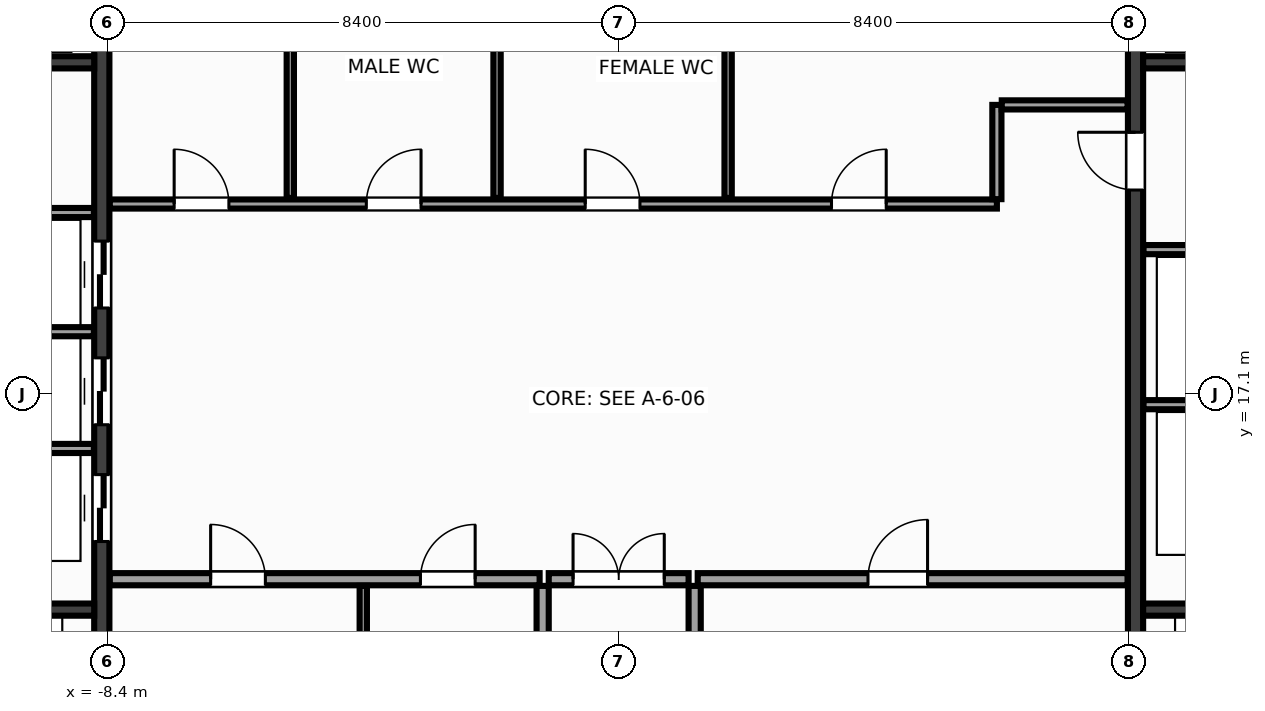
"""IFC4 building model, lengths in metres.
Left out: names, types, materials, properties, quantities, classifications, styles, units other than length and angle.
Written with IfcOpenShell. Run it as: python <this file> out.ifc"""

import sys

from ifc_helpers import new_model, si_unit, direction, frame, frame_2d, origin, place, context, subcontext, project, spatial, rectangle, extrude, source, transform, mapped, element, fill, save


model = new_model("IFC4")
c1 = context("Model", 3, precision=1e-05, world=origin(), true_north=direction((0.0, 1.0)))
c2 = subcontext(c1, "Body", "Model", "MODEL_VIEW")
j1 = project(units=[si_unit("LENGTHUNIT", "METRE"), si_unit("PLANEANGLEUNIT", "RADIAN")], contexts=[c1])
p1 = place(None, origin())
s1 = spatial("IfcSite", under=j1, at=p1, CompositionType="ELEMENT")
p2 = place(p1, origin())
s2 = spatial("IfcBuilding", under=s1, at=p2, CompositionType="ELEMENT")
p3 = place(p2, frame((0.0, 0.0, 214.4)))
s3 = spatial("IfcBuildingStorey", under=s2, at=p3, CompositionType="ELEMENT", Elevation=214.4)
m1 = source(origin(), c2, "Body", "SweptSolid", [
    extrude(rectangle(XDim=13.1, YDim=0.25, at=frame_2d((6.55, 0.0))), origin(), (0.0, 0.0, 1.0), 3.6),
])
p4 = place(p3, frame((-8.5, 10.45, 0.0), z_axis=(0.0, 0.0, 1.0), x_axis=(0.0, 1.0, 0.0)))
e1 = element("IfcWall", 1, at=p4, inside=s3, PredefinedType="SHEAR", context=c2, shape_type="MappedRepresentation", body=[
    mapped(m1, transform((0.0, 0.0, 0.0), x_axis=(1.0, 0.0, 0.0), y_axis=(0.0, 1.0, 0.0), z_axis=(0.0, 0.0, 1.0), scale=1.0)),
])
p5 = place(p4, frame((4.22, 0.0, 0.0)))
e2 = element("IfcOpeningElement", 2, at=p5, cuts=e1, PredefinedType="OPENING", context=c2, shape_type="SweptSolid", body=[
    extrude(rectangle(XDim=1.1, YDim=2.15, at=frame_2d((0.55, 1.075))), frame((0.0, 0.137, 0.0), z_axis=(0.0, -1.0, 0.0), x_axis=(1.0, 0.0, 0.0)), (0.0, 0.0, 1.0), 0.274),
])
p6 = place(p4, frame((6.14, 0.0, 0.0)))
e3 = element("IfcOpeningElement", 3, at=p6, cuts=e1, PredefinedType="OPENING", context=c2, shape_type="SweptSolid", body=[
    extrude(rectangle(XDim=1.1, YDim=2.15, at=frame_2d((0.55, 1.075))), frame((0.0, 0.137, 0.0), z_axis=(0.0, -1.0, 0.0), x_axis=(1.0, 0.0, 0.0)), (0.0, 0.0, 1.0), 0.274),
])
p7 = place(p4, frame((8.06, 0.0, 0.0)))
e4 = element("IfcOpeningElement", 4, at=p7, cuts=e1, PredefinedType="OPENING", context=c2, shape_type="SweptSolid", body=[
    extrude(rectangle(XDim=1.1, YDim=2.15, at=frame_2d((0.55, 1.075))), frame((0.0, 0.137, 0.0), z_axis=(0.0, -1.0, 0.0), x_axis=(1.0, 0.0, 0.0)), (0.0, 0.0, 1.0), 0.274),
])
p8 = place(p3, frame((8.5, 10.45, 0.0), z_axis=(0.0, 0.0, 1.0), x_axis=(0.0, 1.0, 0.0)))
e5 = element("IfcWall", 5, at=p8, inside=s3, PredefinedType="SHEAR", context=c2, shape_type="MappedRepresentation", body=[
    mapped(m1, transform((0.0, 0.0, 0.0), x_axis=(1.0, 0.0, 0.0), y_axis=(0.0, 1.0, 0.0), z_axis=(0.0, 0.0, 1.0), scale=1.0)),
])
p9 = place(p8, frame((10.0, 0.0, 0.0)))
e6 = element("IfcOpeningElement", 6, at=p9, cuts=e5, PredefinedType="OPENING", context=c2, shape_type="SweptSolid", body=[
    extrude(rectangle(XDim=0.95, YDim=2.15, at=frame_2d((0.475, 1.075))), frame((0.0, 0.137, 0.0), z_axis=(0.0, -1.0, 0.0), x_axis=(1.0, 0.0, 0.0)), (0.0, 0.0, 1.0), 0.274),
])
m2 = source(origin(), c2, "Body", "SweptSolid", [
    extrude(rectangle(XDim=2.825, YDim=0.2, at=frame_2d((1.413, 0.0))), origin(), (0.0, 0.0, 1.0), 3.6),
])
for number, where, z_axis, x_axis in (
    (7, (-11.45, 13.55, 0.0), (0.0, 0.0, 1.0), (1.0, 0.0, 0.0)),
    (8, (8.625, 13.55, 0.0), (0.0, 0.0, 1.0), (1.0, 0.0, 0.0)),
):
    element("IfcWall", number, at=place(p3, frame(where, z_axis=z_axis, x_axis=x_axis)), inside=s3, PredefinedType="SHEAR", context=c2, shape_type="MappedRepresentation", body=[
        mapped(m2, transform((0.0, 0.0, 0.0), x_axis=(1.0, 0.0, 0.0), y_axis=(0.0, 1.0, 0.0), z_axis=(0.0, 0.0, 1.0), scale=1.0)),
    ])
m3 = source(origin(), c2, "Body", "SweptSolid", [
    extrude(rectangle(XDim=3.02, YDim=0.2, at=frame_2d((1.51, 0.0))), origin(), (0.0, 0.0, 1.0), 3.6),
])
for number, where, z_axis, x_axis in (
    (9, (-11.645, 22.55, 0.0), (0.0, 0.0, 1.0), (1.0, 0.0, 0.0)),
    (10, (8.625, 22.55, 0.0), (0.0, 0.0, 1.0), (1.0, 0.0, 0.0)),
):
    element("IfcWall", number, at=place(p3, frame(where, z_axis=z_axis, x_axis=x_axis)), inside=s3, PredefinedType="SHEAR", context=c2, shape_type="MappedRepresentation", body=[
        mapped(m3, transform((0.0, 0.0, 0.0), x_axis=(1.0, 0.0, 0.0), y_axis=(0.0, 1.0, 0.0), z_axis=(0.0, 0.0, 1.0), scale=1.0)),
    ])
m4 = source(origin(), c2, "Body", "SweptSolid", [
    extrude(rectangle(XDim=3.01, YDim=0.15, at=frame_2d((1.505, 0.0))), origin(), (0.0, 0.0, 1.0), 3.38),
])
for number, where, z_axis, x_axis in (
    (11, (-11.64, 16.2, 0.0), (0.0, 0.0, 1.0), (1.0, 0.0, 0.0)),
    (12, (-11.64, 18.12, 0.0), (0.0, 0.0, 1.0), (1.0, 0.0, 0.0)),
    (13, (-11.64, 20.08, 0.0), (0.0, 0.0, 1.0), (1.0, 0.0, 0.0)),
    (14, (8.63, 16.92, 0.0), (0.0, 0.0, 1.0), (1.0, 0.0, 0.0)),
    (15, (8.63, 19.47, 0.0), (0.0, 0.0, 1.0), (1.0, 0.0, 0.0)),
):
    element("IfcWall", number, at=place(p3, frame(where, z_axis=z_axis, x_axis=x_axis)), inside=s3, PredefinedType="PARTITIONING", context=c2, shape_type="MappedRepresentation", body=[
        mapped(m4, transform((0.0, 0.0, 0.0), x_axis=(1.0, 0.0, 0.0), y_axis=(0.0, 1.0, 0.0), z_axis=(0.0, 0.0, 1.0), scale=1.0)),
    ])
m5 = source(origin(), c2, "Body", "SweptSolid", [
    extrude(rectangle(XDim=7.07, YDim=0.2, at=frame_2d((3.535, 0.0))), origin(), (0.0, 0.0, 1.0), 3.38),
])
p10 = place(p3, frame((-8.37, 14.05, 0.0), z_axis=(0.0, 0.0, 1.0), x_axis=(1.0, 0.0, 0.0)))
e16 = element("IfcWall", 16, at=p10, inside=s3, PredefinedType="PARTITIONING", context=c2, shape_type="MappedRepresentation", body=[
    mapped(m5, transform((0.0, 0.0, 0.0), x_axis=(1.0, 0.0, 0.0), y_axis=(0.0, 1.0, 0.0), z_axis=(0.0, 0.0, 1.0), scale=1.0)),
])
p11 = place(p10, frame((1.66, 0.0, 0.0)))
e17 = element("IfcOpeningElement", 17, at=p11, cuts=e16, PredefinedType="OPENING", context=c2, shape_type="SweptSolid", body=[
    extrude(rectangle(XDim=0.9, YDim=2.15, at=frame_2d((0.45, 1.075))), frame((0.0, 0.112, 0.0), z_axis=(0.0, -1.0, 0.0), x_axis=(1.0, 0.0, 0.0)), (0.0, 0.0, 1.0), 0.224),
])
p12 = place(p10, frame((5.11, 0.0, 0.0)))
e18 = element("IfcOpeningElement", 18, at=p12, cuts=e16, PredefinedType="OPENING", context=c2, shape_type="SweptSolid", body=[
    extrude(rectangle(XDim=0.9, YDim=2.15, at=frame_2d((0.45, 1.075))), frame((0.0, 0.112, 0.0), z_axis=(0.0, -1.0, 0.0), x_axis=(1.0, 0.0, 0.0)), (0.0, 0.0, 1.0), 0.224),
])
p13 = place(p3, frame((1.3, 14.05, 0.0), z_axis=(0.0, 0.0, 1.0), x_axis=(1.0, 0.0, 0.0)))
e19 = element("IfcWall", 19, at=p13, inside=s3, PredefinedType="PARTITIONING", context=c2, shape_type="MappedRepresentation", body=[
    mapped(m5, transform((0.0, 0.0, 0.0), x_axis=(1.0, 0.0, 0.0), y_axis=(0.0, 1.0, 0.0), z_axis=(0.0, 0.0, 1.0), scale=1.0)),
])
p14 = place(p13, frame((2.8, 0.0, 0.0)))
e20 = element("IfcOpeningElement", 20, at=p14, cuts=e19, PredefinedType="OPENING", context=c2, shape_type="SweptSolid", body=[
    extrude(rectangle(XDim=0.98, YDim=2.15, at=frame_2d((0.49, 1.075))), frame((0.0, 0.112, 0.0), z_axis=(0.0, -1.0, 0.0), x_axis=(1.0, 0.0, 0.0)), (0.0, 0.0, 1.0), 0.224),
])
m6 = source(origin(), c2, "Body", "SweptSolid", [
    extrude(rectangle(XDim=3.49, YDim=0.2, at=frame_2d((1.745, 0.0))), origin(), (0.0, 0.0, 1.0), 3.38),
])
for number, where, z_axis, x_axis in (
    (21, (-1.25, 10.45, 0.0), (0.0, 0.0, 1.0), (0.0, 1.0, 0.0)),
    (22, (1.25, 10.45, 0.0), (0.0, 0.0, 1.0), (0.0, 1.0, 0.0)),
):
    element("IfcWall", number, at=place(p3, frame(where, z_axis=z_axis, x_axis=x_axis)), inside=s3, PredefinedType="PARTITIONING", context=c2, shape_type="MappedRepresentation", body=[
        mapped(m6, transform((0.0, 0.0, 0.0), x_axis=(1.0, 0.0, 0.0), y_axis=(0.0, 1.0, 0.0), z_axis=(0.0, 0.0, 1.0), scale=1.0)),
    ])
m7 = source(origin(), c2, "Body", "SweptSolid", [
    extrude(rectangle(XDim=2.3, YDim=0.2, at=frame_2d((1.15, 0.0))), origin(), (0.0, 0.0, 1.0), 3.38),
])
p15 = place(p3, frame((-1.15, 14.05, 0.0), z_axis=(0.0, 0.0, 1.0), x_axis=(1.0, 0.0, 0.0)))
e23 = element("IfcWall", 23, at=p15, inside=s3, PredefinedType="PARTITIONING", context=c2, shape_type="MappedRepresentation", body=[
    mapped(m7, transform((0.0, 0.0, 0.0), x_axis=(1.0, 0.0, 0.0), y_axis=(0.0, 1.0, 0.0), z_axis=(0.0, 0.0, 1.0), scale=1.0)),
])
p16 = place(p15, frame((0.4, 0.0, 0.0)))
e24 = element("IfcOpeningElement", 24, at=p16, cuts=e23, PredefinedType="OPENING", context=c2, shape_type="SweptSolid", body=[
    extrude(rectangle(XDim=1.5, YDim=2.2, at=frame_2d((0.75, 1.1))), frame((0.0, 0.112, 0.0), z_axis=(0.0, -1.0, 0.0), x_axis=(1.0, 0.0, 0.0)), (0.0, 0.0, 1.0), 0.224),
])
m8 = source(origin(), c2, "Body", "SweptSolid", [
    extrude(rectangle(XDim=14.59, YDim=0.15, at=frame_2d((7.295, 0.0))), origin(), (0.0, 0.0, 1.0), 3.38),
])
p17 = place(p3, frame((-8.37, 20.22, 0.0), z_axis=(0.0, 0.0, 1.0), x_axis=(1.0, 0.0, 0.0)))
e25 = element("IfcWall", 25, at=p17, inside=s3, PredefinedType="PARTITIONING", context=c2, shape_type="MappedRepresentation", body=[
    mapped(m8, transform((0.0, 0.0, 0.0), x_axis=(1.0, 0.0, 0.0), y_axis=(0.0, 1.0, 0.0), z_axis=(0.0, 0.0, 1.0), scale=1.0)),
])
p18 = place(p17, frame((1.06, 0.0, 0.0)))
e26 = element("IfcOpeningElement", 26, at=p18, cuts=e25, PredefinedType="OPENING", context=c2, shape_type="SweptSolid", body=[
    extrude(rectangle(XDim=0.9, YDim=2.15, at=frame_2d((0.45, 1.075))), frame((0.0, 0.087, 0.0), z_axis=(0.0, -1.0, 0.0), x_axis=(1.0, 0.0, 0.0)), (0.0, 0.0, 1.0), 0.174),
])
p19 = place(p17, frame((4.22, 0.0, 0.0)))
e27 = element("IfcOpeningElement", 27, at=p19, cuts=e25, PredefinedType="OPENING", context=c2, shape_type="SweptSolid", body=[
    extrude(rectangle(XDim=0.9, YDim=2.15, at=frame_2d((0.45, 1.075))), frame((0.0, 0.087, 0.0), z_axis=(0.0, -1.0, 0.0), x_axis=(1.0, 0.0, 0.0)), (0.0, 0.0, 1.0), 0.174),
])
p20 = place(p17, frame((7.82, 0.0, 0.0)))
e28 = element("IfcOpeningElement", 28, at=p20, cuts=e25, PredefinedType="OPENING", context=c2, shape_type="SweptSolid", body=[
    extrude(rectangle(XDim=0.9, YDim=2.15, at=frame_2d((0.45, 1.075))), frame((0.0, 0.087, 0.0), z_axis=(0.0, -1.0, 0.0), x_axis=(1.0, 0.0, 0.0)), (0.0, 0.0, 1.0), 0.174),
])
p21 = place(p17, frame((11.87, 0.0, 0.0)))
e29 = element("IfcOpeningElement", 29, at=p21, cuts=e25, PredefinedType="OPENING", context=c2, shape_type="SweptSolid", body=[
    extrude(rectangle(XDim=0.9, YDim=2.15, at=frame_2d((0.45, 1.075))), frame((0.0, 0.087, 0.0), z_axis=(0.0, -1.0, 0.0), x_axis=(1.0, 0.0, 0.0)), (0.0, 0.0, 1.0), 0.174),
])
m9 = source(origin(), c2, "Body", "SweptSolid", [
    extrude(rectangle(XDim=1.55, YDim=0.15, at=frame_2d((0.775, 0.0))), origin(), (0.0, 0.0, 1.0), 3.38),
])
p22 = place(p3, frame((6.22, 20.3, 0.0), z_axis=(0.0, 0.0, 1.0), x_axis=(0.0, 1.0, 0.0)))
e30 = element("IfcWall", 30, at=p22, inside=s3, PredefinedType="PARTITIONING", context=c2, shape_type="MappedRepresentation", body=[
    mapped(m9, transform((0.0, 0.0, 0.0), x_axis=(1.0, 0.0, 0.0), y_axis=(0.0, 1.0, 0.0), z_axis=(0.0, 0.0, 1.0), scale=1.0)),
])
m10 = source(origin(), c2, "Body", "SweptSolid", [
    extrude(rectangle(XDim=2.07, YDim=0.15, at=frame_2d((1.035, 0.0))), origin(), (0.0, 0.0, 1.0), 3.38),
])
p23 = place(p3, frame((6.3, 21.85, 0.0), z_axis=(0.0, 0.0, 1.0), x_axis=(1.0, 0.0, 0.0)))
e31 = element("IfcWall", 31, at=p23, inside=s3, PredefinedType="PARTITIONING", context=c2, shape_type="MappedRepresentation", body=[
    mapped(m10, transform((0.0, 0.0, 0.0), x_axis=(1.0, 0.0, 0.0), y_axis=(0.0, 1.0, 0.0), z_axis=(0.0, 0.0, 1.0), scale=1.0)),
])
m11 = source(origin(), c2, "Body", "SweptSolid", [
    extrude(rectangle(XDim=3.49, YDim=0.12, at=frame_2d((1.745, 0.0))), origin(), (0.0, 0.0, 1.0), 3.38),
])
p24 = place(p3, frame((-4.2, 10.45, 0.0), z_axis=(0.0, 0.0, 1.0), x_axis=(0.0, 1.0, 0.0)))
e32 = element("IfcWall", 32, at=p24, inside=s3, PredefinedType="PARTITIONING", context=c2, shape_type="MappedRepresentation", body=[
    mapped(m11, transform((0.0, 0.0, 0.0), x_axis=(1.0, 0.0, 0.0), y_axis=(0.0, 1.0, 0.0), z_axis=(0.0, 0.0, 1.0), scale=1.0)),
])
m12 = source(origin(), c2, "Body", "SweptSolid", [
    extrude(rectangle(XDim=3.19, YDim=0.12, at=frame_2d((1.595, 0.0))), origin(), (0.0, 0.0, 1.0), 3.38),
])
for number, where, z_axis, x_axis in (
    (33, (-5.4, 20.32, 0.0), (0.0, 0.0, 1.0), (0.0, 1.0, 0.0)),
    (34, (-2.0, 20.32, 0.0), (0.0, 0.0, 1.0), (0.0, 1.0, 0.0)),
    (35, (1.8, 20.32, 0.0), (0.0, 0.0, 1.0), (0.0, 1.0, 0.0)),
):
    element("IfcWall", number, at=place(p3, frame(where, z_axis=z_axis, x_axis=x_axis)), inside=s3, PredefinedType="PARTITIONING", context=c2, shape_type="MappedRepresentation", body=[
        mapped(m12, transform((0.0, 0.0, 0.0), x_axis=(1.0, 0.0, 0.0), y_axis=(0.0, 1.0, 0.0), z_axis=(0.0, 0.0, 1.0), scale=1.0)),
    ])
m13 = source(origin(), c2, "Body", "SweptSolid", [
    extrude(rectangle(XDim=1.1, YDim=2.15, at=frame_2d((0.55, 1.075))), frame((0.0, 0.025, 0.0), z_axis=(0.0, -1.0, 0.0), x_axis=(1.0, 0.0, 0.0)), (0.0, 0.0, 1.0), 0.05),
])
p25 = place(p5, origin())
e36 = element("IfcDoor", 36, at=p25, inside=s3, OperationType="DOUBLE_DOOR_SLIDING", PredefinedType="DOOR", context=c2, shape_type="MappedRepresentation", body=[
    mapped(m13, transform((0.0, 0.0, 0.0), x_axis=(1.0, 0.0, 0.0), y_axis=(0.0, 1.0, 0.0), z_axis=(0.0, 0.0, 1.0), scale=1.0)),
])
fill(e2, e36)
p26 = place(p6, origin())
e37 = element("IfcDoor", 37, at=p26, inside=s3, OperationType="DOUBLE_DOOR_SLIDING", PredefinedType="DOOR", context=c2, shape_type="MappedRepresentation", body=[
    mapped(m13, transform((0.0, 0.0, 0.0), x_axis=(1.0, 0.0, 0.0), y_axis=(0.0, 1.0, 0.0), z_axis=(0.0, 0.0, 1.0), scale=1.0)),
])
fill(e3, e37)
p27 = place(p7, origin())
e38 = element("IfcDoor", 38, at=p27, inside=s3, OperationType="DOUBLE_DOOR_SLIDING", PredefinedType="DOOR", context=c2, shape_type="MappedRepresentation", body=[
    mapped(m13, transform((0.0, 0.0, 0.0), x_axis=(1.0, 0.0, 0.0), y_axis=(0.0, 1.0, 0.0), z_axis=(0.0, 0.0, 1.0), scale=1.0)),
])
fill(e4, e38)
m14 = source(origin(), c2, "Body", "SweptSolid", [
    extrude(rectangle(XDim=0.95, YDim=2.15, at=frame_2d((0.475, 1.075))), frame((0.0, 0.025, 0.0), z_axis=(0.0, -1.0, 0.0), x_axis=(1.0, 0.0, 0.0)), (0.0, 0.0, 1.0), 0.05),
])
p28 = place(p9, origin())
e39 = element("IfcDoor", 39, at=p28, inside=s3, OperationType="SINGLE_SWING_RIGHT", PredefinedType="DOOR", context=c2, shape_type="MappedRepresentation", body=[
    mapped(m14, transform((0.0, 0.0, 0.0), x_axis=(1.0, 0.0, 0.0), y_axis=(0.0, 1.0, 0.0), z_axis=(0.0, 0.0, 1.0), scale=1.0)),
])
fill(e6, e39)
m15 = source(origin(), c2, "Body", "SweptSolid", [
    extrude(rectangle(XDim=0.9, YDim=2.15, at=frame_2d((0.45, 1.075))), frame((0.0, 0.025, 0.0), z_axis=(0.0, -1.0, 0.0), x_axis=(1.0, 0.0, 0.0)), (0.0, 0.0, 1.0), 0.05),
])
p29 = place(p11, origin())
e40 = element("IfcDoor", 40, at=p29, inside=s3, OperationType="SINGLE_SWING_LEFT", PredefinedType="DOOR", context=c2, shape_type="MappedRepresentation", body=[
    mapped(m15, transform((0.0, 0.0, 0.0), x_axis=(1.0, 0.0, 0.0), y_axis=(0.0, 1.0, 0.0), z_axis=(0.0, 0.0, 1.0), scale=1.0)),
])
fill(e17, e40)
p30 = place(p12, origin())
e41 = element("IfcDoor", 41, at=p30, inside=s3, OperationType="SINGLE_SWING_RIGHT", PredefinedType="DOOR", context=c2, shape_type="MappedRepresentation", body=[
    mapped(m15, transform((0.0, 0.0, 0.0), x_axis=(1.0, 0.0, 0.0), y_axis=(0.0, 1.0, 0.0), z_axis=(0.0, 0.0, 1.0), scale=1.0)),
])
fill(e18, e41)
m16 = source(origin(), c2, "Body", "SweptSolid", [
    extrude(rectangle(XDim=0.98, YDim=2.15, at=frame_2d((0.49, 1.075))), frame((0.0, 0.025, 0.0), z_axis=(0.0, -1.0, 0.0), x_axis=(1.0, 0.0, 0.0)), (0.0, 0.0, 1.0), 0.05),
])
p31 = place(p14, origin())
e42 = element("IfcDoor", 42, at=p31, inside=s3, OperationType="SINGLE_SWING_RIGHT", PredefinedType="DOOR", context=c2, shape_type="MappedRepresentation", body=[
    mapped(m16, transform((0.0, 0.0, 0.0), x_axis=(1.0, 0.0, 0.0), y_axis=(0.0, 1.0, 0.0), z_axis=(0.0, 0.0, 1.0), scale=1.0)),
])
fill(e20, e42)
m17 = source(origin(), c2, "Body", "SweptSolid", [
    extrude(rectangle(XDim=1.5, YDim=2.2, at=frame_2d((0.75, 1.1))), frame((0.0, 0.025, 0.0), z_axis=(0.0, -1.0, 0.0), x_axis=(1.0, 0.0, 0.0)), (0.0, 0.0, 1.0), 0.05),
])
p32 = place(p16, origin())
e43 = element("IfcDoor", 43, at=p32, inside=s3, OperationType="DOUBLE_DOOR_SINGLE_SWING", PredefinedType="DOOR", context=c2, shape_type="MappedRepresentation", body=[
    mapped(m17, transform((0.0, 0.0, 0.0), x_axis=(1.0, 0.0, 0.0), y_axis=(0.0, 1.0, 0.0), z_axis=(0.0, 0.0, 1.0), scale=1.0)),
])
fill(e24, e43)
p33 = place(p18, origin())
e44 = element("IfcDoor", 44, at=p33, inside=s3, OperationType="SINGLE_SWING_LEFT", PredefinedType="DOOR", context=c2, shape_type="MappedRepresentation", body=[
    mapped(m15, transform((0.0, 0.0, 0.0), x_axis=(1.0, 0.0, 0.0), y_axis=(0.0, 1.0, 0.0), z_axis=(0.0, 0.0, 1.0), scale=1.0)),
])
fill(e26, e44)
p34 = place(p19, origin())
e45 = element("IfcDoor", 45, at=p34, inside=s3, OperationType="SINGLE_SWING_RIGHT", PredefinedType="DOOR", context=c2, shape_type="MappedRepresentation", body=[
    mapped(m15, transform((0.0, 0.0, 0.0), x_axis=(1.0, 0.0, 0.0), y_axis=(0.0, 1.0, 0.0), z_axis=(0.0, 0.0, 1.0), scale=1.0)),
])
fill(e27, e45)
p35 = place(p20, origin())
e46 = element("IfcDoor", 46, at=p35, inside=s3, OperationType="SINGLE_SWING_LEFT", PredefinedType="DOOR", context=c2, shape_type="MappedRepresentation", body=[
    mapped(m15, transform((0.0, 0.0, 0.0), x_axis=(1.0, 0.0, 0.0), y_axis=(0.0, 1.0, 0.0), z_axis=(0.0, 0.0, 1.0), scale=1.0)),
])
fill(e28, e46)
p36 = place(p21, origin())
e47 = element("IfcDoor", 47, at=p36, inside=s3, OperationType="SINGLE_SWING_RIGHT", PredefinedType="DOOR", context=c2, shape_type="MappedRepresentation", body=[
    mapped(m15, transform((0.0, 0.0, 0.0), x_axis=(1.0, 0.0, 0.0), y_axis=(0.0, 1.0, 0.0), z_axis=(0.0, 0.0, 1.0), scale=1.0)),
])
fill(e29, e47)
save(model, sys.argv[1])
